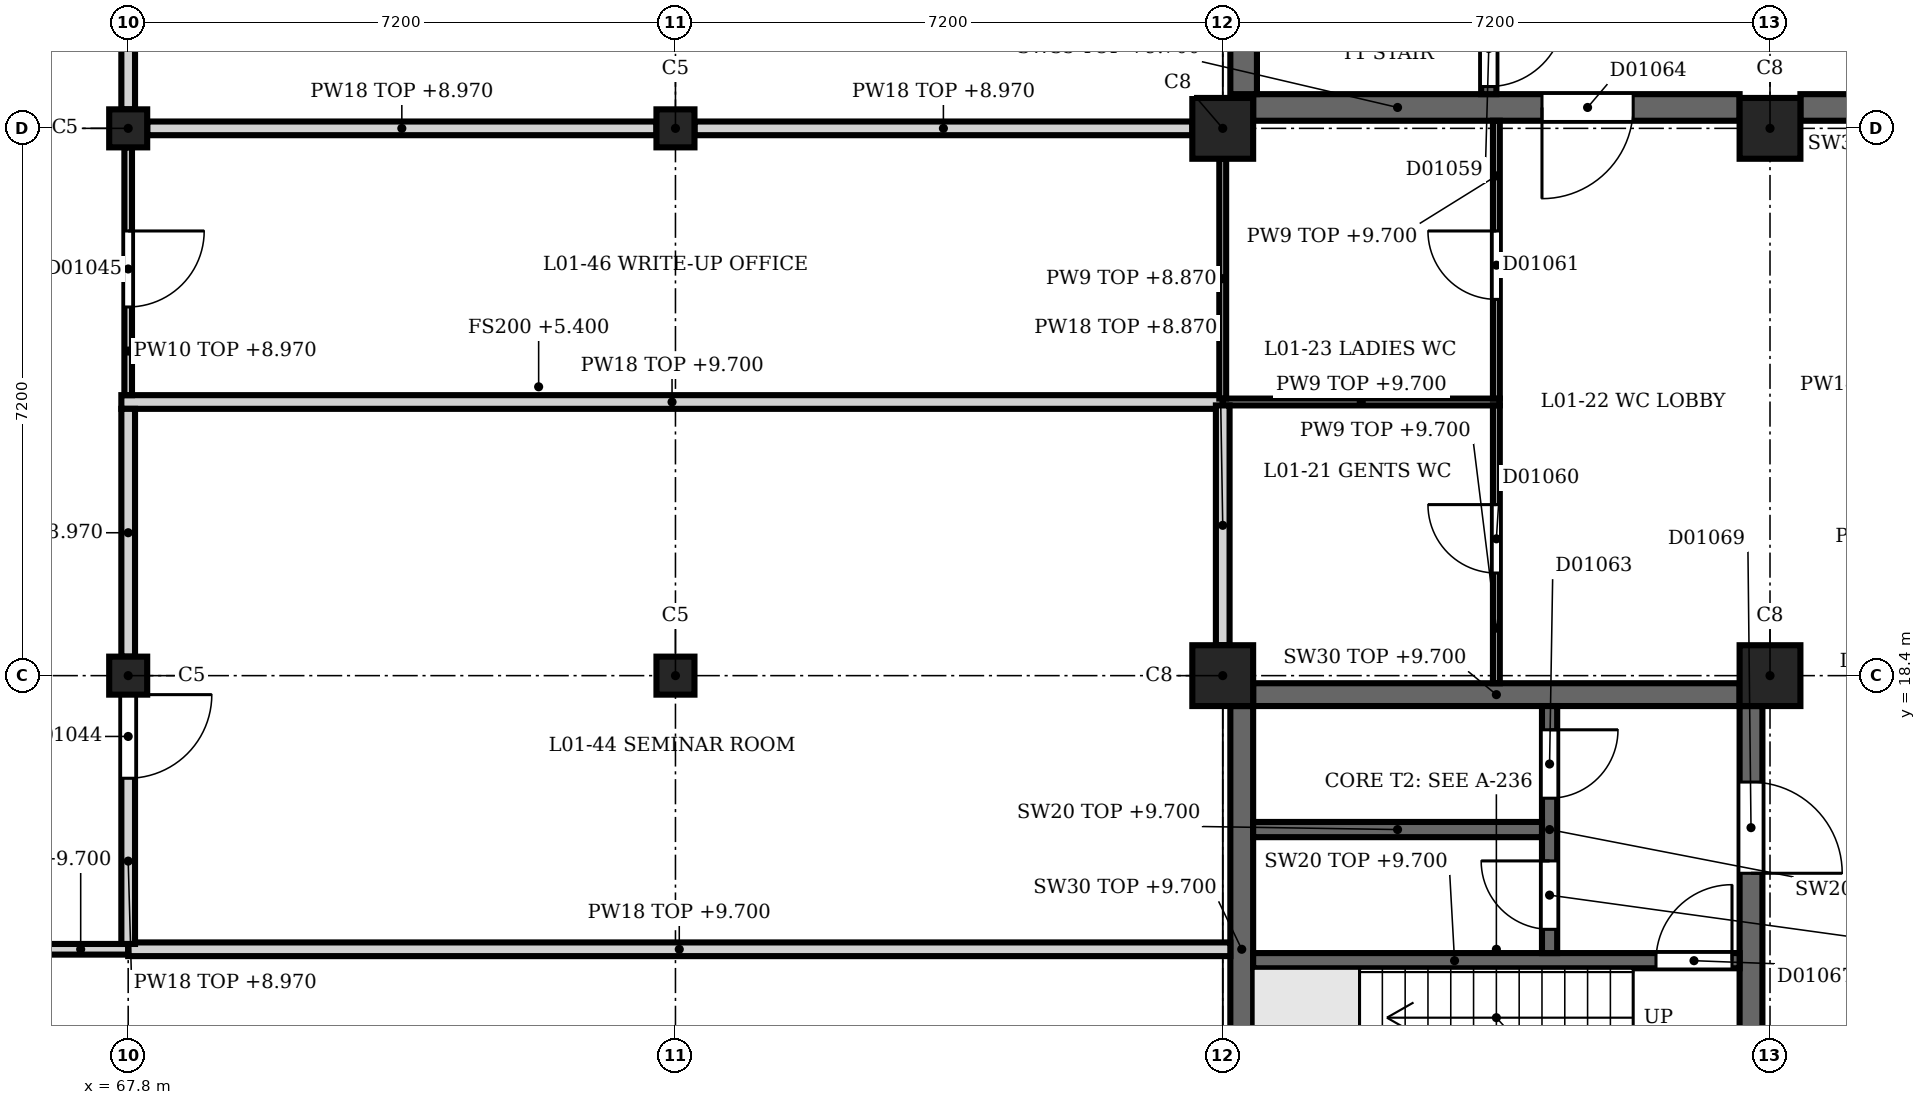
"""IFC4 building model, lengths in metres.
Left out: names, types, materials, properties, quantities, classifications, styles, units other than length and angle.
Written with IfcOpenShell. Run it as: python <this file> out.ifc"""

import sys

from ifc_helpers import new_model, si_unit, direction, frame, frame_2d, origin, origin_2d, place, context, subcontext, project, spatial, rectangle, extrude, element, fill, save


model = new_model("IFC4")
c1 = context("Model", 3, precision=1e-05, world=origin(), true_north=direction((0.0, 1.0)))
c2 = subcontext(c1, "Body", "Model", "MODEL_VIEW")
j1 = project(units=[si_unit("LENGTHUNIT", "METRE"), si_unit("PLANEANGLEUNIT", "RADIAN")], contexts=[c1])
p1 = place(None, origin())
s1 = spatial("IfcSite", under=j1, at=p1, CompositionType="ELEMENT")
p2 = place(p1, origin())
s2 = spatial("IfcBuilding", under=s1, at=p2, CompositionType="ELEMENT")
p3 = place(p2, frame((0.0, 0.0, 5.4)))
s3 = spatial("IfcBuildingStorey", under=s2, at=p3, CompositionType="ELEMENT", Elevation=5.4)
for number, where, z_axis, x_axis in (
    (1, (82.2, 18.4, 0.0), (0.0, 0.0, 1.0), (1.0, 0.0, 0.0)),
    (2, (82.2, 25.6, 0.0), (0.0, 0.0, 1.0), (1.0, 0.0, 0.0)),
    (3, (89.4, 18.4, 0.0), (0.0, 0.0, 1.0), (1.0, 0.0, 0.0)),
    (4, (89.4, 25.6, 0.0), (0.0, 0.0, 1.0), (1.0, 0.0, 0.0)),
):
    element("IfcColumn", number, at=place(p3, frame(where, z_axis=z_axis, x_axis=x_axis)), inside=s3, PredefinedType="COLUMN", context=c2, shape_type="SweptSolid", body=[
        extrude(rectangle(XDim=0.8, YDim=0.8, at=origin_2d()), origin(), (0.0, 0.0, 1.0), 4.5),
    ])
for number, where, z_axis, x_axis in (
    (5, (67.8, 18.4, 0.0), (0.0, 0.0, 1.0), (1.0, 0.0, 0.0)),
    (6, (67.8, 25.6, 0.0), (0.0, 0.0, 1.0), (1.0, 0.0, 0.0)),
    (7, (75.0, 18.4, 0.0), (0.0, 0.0, 1.0), (1.0, 0.0, 0.0)),
    (8, (75.0, 25.6, 0.0), (0.0, 0.0, 1.0), (1.0, 0.0, 0.0)),
):
    element("IfcColumn", number, at=place(p3, frame(where, z_axis=z_axis, x_axis=x_axis)), inside=s3, PredefinedType="COLUMN", context=c2, shape_type="SweptSolid", body=[
        extrude(rectangle(XDim=0.5, YDim=0.5, at=origin_2d()), origin(), (0.0, 0.0, 1.0), 4.5),
    ])
p4 = place(p3, frame((82.6, 25.875, 0.0), z_axis=(0.0, 0.0, 1.0), x_axis=(1.0, 0.0, 0.0)))
e9 = element("IfcWall", 9, at=p4, inside=s3, PredefinedType="SHEAR", context=c2, shape_type="SweptSolid", body=[
    extrude(rectangle(XDim=6.4, YDim=0.35, at=frame_2d((3.2, 0.0))), origin(), (0.0, 0.0, 1.0), 4.3),
])
p5 = place(p4, frame((3.8, 0.0, 0.0)))
e10 = element("IfcOpeningElement", 10, at=p5, cuts=e9, PredefinedType="OPENING", context=c2, shape_type="SweptSolid", body=[
    extrude(rectangle(XDim=1.2, YDim=2.1, at=frame_2d((0.6, 1.05))), frame((0.0, 0.185, 0.0), z_axis=(0.0, -1.0, 0.0), x_axis=(1.0, 0.0, 0.0)), (0.0, 0.0, 1.0), 0.37),
])
p6 = place(p3, frame((89.8, 25.875, 0.0), z_axis=(0.0, 0.0, 1.0), x_axis=(1.0, 0.0, 0.0)))
e11 = element("IfcWall", 11, at=p6, inside=s3, PredefinedType="SHEAR", context=c2, shape_type="SweptSolid", body=[
    extrude(rectangle(XDim=6.4, YDim=0.35, at=frame_2d((3.2, 0.0))), origin(), (0.0, 0.0, 1.0), 4.3),
])
p7 = place(p6, frame((2.6, 0.0, 0.0)))
e12 = element("IfcOpeningElement", 12, at=p7, cuts=e11, PredefinedType="OPENING", context=c2, shape_type="SweptSolid", body=[
    extrude(rectangle(XDim=1.8, YDim=2.1, at=frame_2d((0.9, 1.05))), frame((0.0, 0.185, 0.0), z_axis=(0.0, -1.0, 0.0), x_axis=(1.0, 0.0, 0.0)), (0.0, 0.0, 1.0), 0.37),
])
p8 = place(p3, frame((82.475, 26.05, 0.0), z_axis=(0.0, 0.0, 1.0), x_axis=(0.0, 1.0, 0.0)))
e13 = element("IfcWall", 13, at=p8, inside=s3, PredefinedType="SHEAR", context=c2, shape_type="SweptSolid", body=[
    extrude(rectangle(XDim=6.3, YDim=0.35, at=frame_2d((3.15, 0.0))), origin(), (0.0, 0.0, 1.0), 4.3),
])
p9 = place(p3, frame((85.7, 26.05, 0.0), z_axis=(0.0, 0.0, 1.0), x_axis=(0.0, 1.0, 0.0)))
e14 = element("IfcWall", 14, at=p9, inside=s3, PredefinedType="SHEAR", context=c2, shape_type="SweptSolid", body=[
    extrude(rectangle(XDim=6.3, YDim=0.2, at=frame_2d((3.15, 0.0))), origin(), (0.0, 0.0, 1.0), 4.3),
])
p10 = place(p9, frame((0.1, 0.0, 0.0)))
e15 = element("IfcOpeningElement", 15, at=p10, cuts=e14, PredefinedType="OPENING", context=c2, shape_type="SweptSolid", body=[
    extrude(rectangle(XDim=1.0, YDim=2.1, at=frame_2d((0.5, 1.05))), frame((0.0, 0.11, 0.0), z_axis=(0.0, -1.0, 0.0), x_axis=(1.0, 0.0, 0.0)), (0.0, 0.0, 1.0), 0.22),
])
p11 = place(p3, frame((89.15, 11.6, 0.0), z_axis=(0.0, 0.0, 1.0), x_axis=(0.0, 1.0, 0.0)))
e16 = element("IfcWall", 16, at=p11, inside=s3, PredefinedType="SHEAR", context=c2, shape_type="SweptSolid", body=[
    extrude(rectangle(XDim=6.4, YDim=0.3, at=frame_2d((3.2, 0.0))), origin(), (0.0, 0.0, 1.0), 4.3),
])
p12 = place(p11, frame((4.2, 0.0, 0.0)))
e17 = element("IfcOpeningElement", 17, at=p12, cuts=e16, PredefinedType="OPENING", context=c2, shape_type="SweptSolid", body=[
    extrude(rectangle(XDim=1.2, YDim=2.1, at=frame_2d((0.6, 1.05))), frame((0.0, 0.16, 0.0), z_axis=(0.0, -1.0, 0.0), x_axis=(1.0, 0.0, 0.0)), (0.0, 0.0, 1.0), 0.32),
])
for number, where, z_axis, x_axis in (
    (18, (82.45, 11.6, 0.0), (0.0, 0.0, 1.0), (0.0, 1.0, 0.0)),
    (19, (82.6, 18.15, 0.0), (0.0, 0.0, 1.0), (1.0, 0.0, 0.0)),
):
    element("IfcWall", number, at=place(p3, frame(where, z_axis=z_axis, x_axis=x_axis)), inside=s3, PredefinedType="SHEAR", context=c2, shape_type="SweptSolid", body=[
        extrude(rectangle(XDim=6.4, YDim=0.3, at=frame_2d((3.2, 0.0))), origin(), (0.0, 0.0, 1.0), 4.3),
    ])
p13 = place(p3, frame((89.0, 14.65, 0.0), z_axis=(0.0, 0.0, 1.0), x_axis=(-1.0, 0.0, 0.0)))
e20 = element("IfcWall", 20, at=p13, inside=s3, PredefinedType="SHEAR", context=c2, shape_type="SweptSolid", body=[
    extrude(rectangle(XDim=6.4, YDim=0.2, at=frame_2d((3.2, 0.0))), origin(), (0.0, 0.0, 1.0), 4.3),
])
p14 = place(p13, frame((0.1, 0.0, 0.0)))
e21 = element("IfcOpeningElement", 21, at=p14, cuts=e20, PredefinedType="OPENING", context=c2, shape_type="SweptSolid", body=[
    extrude(rectangle(XDim=1.0, YDim=2.1, at=frame_2d((0.5, 1.05))), frame((0.0, 0.11, 0.0), z_axis=(0.0, -1.0, 0.0), x_axis=(1.0, 0.0, 0.0)), (0.0, 0.0, 1.0), 0.22),
])
p15 = place(p3, frame((86.5, 18.0, 0.0), z_axis=(0.0, 0.0, 1.0), x_axis=(0.0, -1.0, 0.0)))
e22 = element("IfcWall", 22, at=p15, inside=s3, PredefinedType="SHEAR", context=c2, shape_type="SweptSolid", body=[
    extrude(rectangle(XDim=3.25, YDim=0.2, at=frame_2d((1.625, 0.0))), origin(), (0.0, 0.0, 1.0), 4.3),
])
p16 = place(p15, frame((2.038, 0.0, 0.0)))
e23 = element("IfcOpeningElement", 23, at=p16, cuts=e22, PredefinedType="OPENING", context=c2, shape_type="SweptSolid", body=[
    extrude(rectangle(XDim=0.9, YDim=2.1, at=frame_2d((0.45, 1.05))), frame((0.0, 0.11, 0.0), z_axis=(0.0, -1.0, 0.0), x_axis=(1.0, 0.0, 0.0)), (0.0, 0.0, 1.0), 0.22),
])
p17 = place(p15, frame((0.312, 0.0, 0.0)))
e24 = element("IfcOpeningElement", 24, at=p17, cuts=e22, PredefinedType="OPENING", context=c2, shape_type="SweptSolid", body=[
    extrude(rectangle(XDim=0.9, YDim=2.1, at=frame_2d((0.45, 1.05))), frame((0.0, 0.11, 0.0), z_axis=(0.0, -1.0, 0.0), x_axis=(1.0, 0.0, 0.0)), (0.0, 0.0, 1.0), 0.22),
])
p18 = place(p3, frame((82.6, 16.375, 0.0), z_axis=(0.0, 0.0, 1.0), x_axis=(1.0, 0.0, 0.0)))
e25 = element("IfcWall", 25, at=p18, inside=s3, PredefinedType="SHEAR", context=c2, shape_type="SweptSolid", body=[
    extrude(rectangle(XDim=3.8, YDim=0.2, at=frame_2d((1.9, 0.0))), origin(), (0.0, 0.0, 1.0), 4.3),
])
p19 = place(p3, frame((67.8, 14.8, 0.0), z_axis=(0.0, 0.0, 1.0), x_axis=(-1.0, 0.0, 0.0)))
e26 = element("IfcWall", 26, at=p19, inside=s3, PredefinedType="PARTITIONING", context=c2, shape_type="SweptSolid", body=[
    extrude(rectangle(XDim=3.6, YDim=0.14, at=frame_2d((1.8, 0.0))), origin(), (0.0, 0.0, 1.0), 4.3),
])
p20 = place(p19, frame((1.25, 0.0, 0.0)))
e27 = element("IfcOpeningElement", 27, at=p20, cuts=e26, PredefinedType="OPENING", context=c2, shape_type="SweptSolid", body=[
    extrude(rectangle(XDim=1.1, YDim=2.2, at=frame_2d((0.55, 1.1))), frame((0.0, 0.08, 0.0), z_axis=(0.0, -1.0, 0.0), x_axis=(1.0, 0.0, 0.0)), (0.0, 0.0, 1.0), 0.16),
])
p21 = place(p3, frame((67.8, 14.8, 0.0), z_axis=(0.0, 0.0, 1.0), x_axis=(1.0, 0.0, 0.0)))
e28 = element("IfcWall", 28, at=p21, inside=s3, PredefinedType="PARTITIONING", context=c2, shape_type="SweptSolid", body=[
    extrude(rectangle(XDim=14.5, YDim=0.18, at=frame_2d((7.25, 0.0))), origin(), (0.0, 0.0, 1.0), 4.3),
])
p22 = place(p3, frame((67.71, 22.0, 0.0), z_axis=(0.0, 0.0, 1.0), x_axis=(1.0, 0.0, 0.0)))
e29 = element("IfcWall", 29, at=p22, inside=s3, PredefinedType="PARTITIONING", context=c2, shape_type="SweptSolid", body=[
    extrude(rectangle(XDim=14.49, YDim=0.18, at=frame_2d((7.245, 0.0))), origin(), (0.0, 0.0, 1.0), 4.3),
])
p23 = place(p3, frame((82.2, 22.0, 0.0), z_axis=(0.0, 0.0, 1.0), x_axis=(1.0, 0.0, 0.0)))
e30 = element("IfcWall", 30, at=p23, inside=s3, PredefinedType="PARTITIONING", context=c2, shape_type="SweptSolid", body=[
    extrude(rectangle(XDim=3.645, YDim=0.09, at=frame_2d((1.823, 0.0))), origin(), (0.0, 0.0, 1.0), 4.3),
])
p24 = place(p3, frame((68.05, 25.6, 0.0), z_axis=(0.0, 0.0, 1.0), x_axis=(1.0, 0.0, 0.0)))
e31 = element("IfcWall", 31, at=p24, inside=s3, PredefinedType="PARTITIONING", context=c2, shape_type="SweptSolid", body=[
    extrude(rectangle(XDim=6.7, YDim=0.18, at=frame_2d((3.35, 0.0))), origin(), (0.0, 0.0, 1.0), 3.57),
])
p25 = place(p3, frame((75.25, 25.6, 0.0), z_axis=(0.0, 0.0, 1.0), x_axis=(1.0, 0.0, 0.0)))
e32 = element("IfcWall", 32, at=p25, inside=s3, PredefinedType="PARTITIONING", context=c2, shape_type="SweptSolid", body=[
    extrude(rectangle(XDim=6.55, YDim=0.18, at=frame_2d((3.275, 0.0))), origin(), (0.0, 0.0, 1.0), 3.57),
])
p26 = place(p3, frame((67.8, 18.15, 0.0), z_axis=(0.0, 0.0, 1.0), x_axis=(0.0, -1.0, 0.0)))
e33 = element("IfcWall", 33, at=p26, inside=s3, PredefinedType="PARTITIONING", context=c2, shape_type="SweptSolid", body=[
    extrude(rectangle(XDim=3.28, YDim=0.18, at=frame_2d((1.64, 0.0))), origin(), (0.0, 0.0, 1.0), 3.57),
])
p27 = place(p26, origin())
e34 = element("IfcOpeningElement", 34, at=p27, cuts=e33, PredefinedType="OPENING", context=c2, shape_type="SweptSolid", body=[
    extrude(rectangle(XDim=1.1, YDim=2.3, at=frame_2d((0.55, 1.15))), frame((0.0, 0.1, 0.0), z_axis=(0.0, -1.0, 0.0), x_axis=(1.0, 0.0, 0.0)), (0.0, 0.0, 1.0), 0.2),
])
p28 = place(p3, frame((67.8, 18.65, 0.0), z_axis=(0.0, 0.0, 1.0), x_axis=(0.0, 1.0, 0.0)))
e35 = element("IfcWall", 35, at=p28, inside=s3, PredefinedType="PARTITIONING", context=c2, shape_type="SweptSolid", body=[
    extrude(rectangle(XDim=3.26, YDim=0.18, at=frame_2d((1.63, 0.0))), origin(), (0.0, 0.0, 1.0), 3.57),
])
p29 = place(p3, frame((67.8, 25.35, 0.0), z_axis=(0.0, 0.0, 1.0), x_axis=(0.0, -1.0, 0.0)))
e36 = element("IfcWall", 36, at=p29, inside=s3, PredefinedType="PARTITIONING", context=c2, shape_type="SweptSolid", body=[
    extrude(rectangle(XDim=3.26, YDim=0.1, at=frame_2d((1.63, 0.0))), origin(), (0.0, 0.0, 1.0), 3.57),
])
p30 = place(p29, frame((1.1, 0.0, 0.0)))
e37 = element("IfcOpeningElement", 37, at=p30, cuts=e36, PredefinedType="OPENING", context=c2, shape_type="SweptSolid", body=[
    extrude(rectangle(XDim=1.0, YDim=2.1, at=frame_2d((0.5, 1.05))), frame((0.0, 0.06, 0.0), z_axis=(0.0, -1.0, 0.0), x_axis=(1.0, 0.0, 0.0)), (0.0, 0.0, 1.0), 0.12),
])
p31 = place(p3, frame((67.8, 25.85, 0.0), z_axis=(0.0, 0.0, 1.0), x_axis=(0.0, 1.0, 0.0)))
e38 = element("IfcWall", 38, at=p31, inside=s3, PredefinedType="PARTITIONING", context=c2, shape_type="SweptSolid", body=[
    extrude(rectangle(XDim=3.26, YDim=0.18, at=frame_2d((1.63, 0.0))), origin(), (0.0, 0.0, 1.0), 3.57),
])
p32 = place(p3, frame((82.2, 18.8, 0.0), z_axis=(0.0, 0.0, 1.0), x_axis=(0.0, 1.0, 0.0)))
e39 = element("IfcWall", 39, at=p32, inside=s3, PredefinedType="PARTITIONING", context=c2, shape_type="SweptSolid", body=[
    extrude(rectangle(XDim=3.155, YDim=0.18, at=frame_2d((1.578, 0.0))), origin(), (0.0, 0.0, 1.0), 3.47),
])
p33 = place(p3, frame((82.2, 22.045, 0.0), z_axis=(0.0, 0.0, 1.0), x_axis=(0.0, 1.0, 0.0)))
e40 = element("IfcWall", 40, at=p33, inside=s3, PredefinedType="PARTITIONING", context=c2, shape_type="SweptSolid", body=[
    extrude(rectangle(XDim=3.155, YDim=0.09, at=frame_2d((1.578, 0.0))), origin(), (0.0, 0.0, 1.0), 3.47),
])
p34 = place(p3, frame((85.8, 18.3, 0.0), z_axis=(0.0, 0.0, 1.0), x_axis=(0.0, 1.0, 0.0)))
e41 = element("IfcWall", 41, at=p34, inside=s3, PredefinedType="PARTITIONING", context=c2, shape_type="SweptSolid", body=[
    extrude(rectangle(XDim=3.655, YDim=0.09, at=frame_2d((1.828, 0.0))), origin(), (0.0, 0.0, 1.0), 4.3),
])
p35 = place(p34, frame((1.45, 0.0, 0.0)))
e42 = element("IfcOpeningElement", 42, at=p35, cuts=e41, PredefinedType="OPENING", context=c2, shape_type="SweptSolid", body=[
    extrude(rectangle(XDim=0.9, YDim=2.1, at=frame_2d((0.45, 1.05))), frame((0.0, 0.055, 0.0), z_axis=(0.0, -1.0, 0.0), x_axis=(1.0, 0.0, 0.0)), (0.0, 0.0, 1.0), 0.11),
])
p36 = place(p3, frame((85.8, 22.045, 0.0), z_axis=(0.0, 0.0, 1.0), x_axis=(0.0, 1.0, 0.0)))
e43 = element("IfcWall", 43, at=p36, inside=s3, PredefinedType="PARTITIONING", context=c2, shape_type="SweptSolid", body=[
    extrude(rectangle(XDim=3.655, YDim=0.09, at=frame_2d((1.828, 0.0))), origin(), (0.0, 0.0, 1.0), 4.3),
])
p37 = place(p36, frame((1.305, 0.0, 0.0)))
e44 = element("IfcOpeningElement", 44, at=p37, cuts=e43, PredefinedType="OPENING", context=c2, shape_type="SweptSolid", body=[
    extrude(rectangle(XDim=0.9, YDim=2.1, at=frame_2d((0.45, 1.05))), frame((0.0, 0.055, 0.0), z_axis=(0.0, -1.0, 0.0), x_axis=(1.0, 0.0, 0.0)), (0.0, 0.0, 1.0), 0.11),
])
p38 = place(p5, origin())
e45 = element("IfcDoor", 45, at=p38, inside=s3, OperationType="SINGLE_SWING_RIGHT", PredefinedType="DOOR", context=c2, shape_type="SweptSolid", body=[
    extrude(rectangle(XDim=1.2, YDim=2.1, at=frame_2d((0.6, 1.05))), frame((0.0, 0.025, 0.0), z_axis=(0.0, -1.0, 0.0), x_axis=(1.0, 0.0, 0.0)), (0.0, 0.0, 1.0), 0.05),
])
fill(e10, e45)
p39 = place(p10, origin())
e46 = element("IfcDoor", 46, at=p39, inside=s3, OperationType="SINGLE_SWING_LEFT", PredefinedType="DOOR", context=c2, shape_type="SweptSolid", body=[
    extrude(rectangle(XDim=1.0, YDim=2.1, at=frame_2d((0.5, 1.05))), frame((0.0, 0.025, 0.0), z_axis=(0.0, -1.0, 0.0), x_axis=(1.0, 0.0, 0.0)), (0.0, 0.0, 1.0), 0.05),
])
fill(e15, e46)
p40 = place(p12, origin())
e47 = element("IfcDoor", 47, at=p40, inside=s3, OperationType="SINGLE_SWING_RIGHT", PredefinedType="DOOR", context=c2, shape_type="SweptSolid", body=[
    extrude(rectangle(XDim=1.2, YDim=2.1, at=frame_2d((0.6, 1.05))), frame((0.0, 0.025, 0.0), z_axis=(0.0, -1.0, 0.0), x_axis=(1.0, 0.0, 0.0)), (0.0, 0.0, 1.0), 0.05),
])
fill(e17, e47)
p41 = place(p16, origin())
e48 = element("IfcDoor", 48, at=p41, inside=s3, OperationType="SINGLE_SWING_RIGHT", PredefinedType="DOOR", context=c2, shape_type="SweptSolid", body=[
    extrude(rectangle(XDim=0.9, YDim=2.1, at=frame_2d((0.45, 1.05))), frame((0.0, 0.025, 0.0), z_axis=(0.0, -1.0, 0.0), x_axis=(1.0, 0.0, 0.0)), (0.0, 0.0, 1.0), 0.05),
])
fill(e23, e48)
p42 = place(p17, origin())
e49 = element("IfcDoor", 49, at=p42, inside=s3, OperationType="SINGLE_SWING_LEFT", PredefinedType="DOOR", context=c2, shape_type="SweptSolid", body=[
    extrude(rectangle(XDim=0.9, YDim=2.1, at=frame_2d((0.45, 1.05))), frame((0.0, 0.025, 0.0), z_axis=(0.0, -1.0, 0.0), x_axis=(1.0, 0.0, 0.0)), (0.0, 0.0, 1.0), 0.05),
])
fill(e24, e49)
p43 = place(p14, origin())
e50 = element("IfcDoor", 50, at=p43, inside=s3, OperationType="SINGLE_SWING_LEFT", PredefinedType="DOOR", context=c2, shape_type="SweptSolid", body=[
    extrude(rectangle(XDim=1.0, YDim=2.1, at=frame_2d((0.5, 1.05))), frame((0.0, 0.025, 0.0), z_axis=(0.0, -1.0, 0.0), x_axis=(1.0, 0.0, 0.0)), (0.0, 0.0, 1.0), 0.05),
])
fill(e21, e50)
p44 = place(p27, origin())
e51 = element("IfcDoor", 51, at=p44, inside=s3, OperationType="SINGLE_SWING_LEFT", PredefinedType="DOOR", context=c2, shape_type="SweptSolid", body=[
    extrude(rectangle(XDim=1.1, YDim=2.3, at=frame_2d((0.55, 1.15))), frame((0.0, 0.025, 0.0), z_axis=(0.0, -1.0, 0.0), x_axis=(1.0, 0.0, 0.0)), (0.0, 0.0, 1.0), 0.05),
])
fill(e34, e51)
p45 = place(p30, origin())
e52 = element("IfcDoor", 52, at=p45, inside=s3, OperationType="SINGLE_SWING_LEFT", PredefinedType="DOOR", context=c2, shape_type="SweptSolid", body=[
    extrude(rectangle(XDim=1.0, YDim=2.1, at=frame_2d((0.5, 1.05))), frame((0.0, 0.025, 0.0), z_axis=(0.0, -1.0, 0.0), x_axis=(1.0, 0.0, 0.0)), (0.0, 0.0, 1.0), 0.05),
])
fill(e37, e52)
p46 = place(p35, origin())
e53 = element("IfcDoor", 53, at=p46, inside=s3, OperationType="SINGLE_SWING_RIGHT", PredefinedType="DOOR", context=c2, shape_type="SweptSolid", body=[
    extrude(rectangle(XDim=0.9, YDim=2.1, at=frame_2d((0.45, 1.05))), frame((0.0, 0.025, 0.0), z_axis=(0.0, -1.0, 0.0), x_axis=(1.0, 0.0, 0.0)), (0.0, 0.0, 1.0), 0.05),
])
fill(e42, e53)
p47 = place(p37, origin())
e54 = element("IfcDoor", 54, at=p47, inside=s3, OperationType="SINGLE_SWING_LEFT", PredefinedType="DOOR", context=c2, shape_type="SweptSolid", body=[
    extrude(rectangle(XDim=0.9, YDim=2.1, at=frame_2d((0.45, 1.05))), frame((0.0, 0.025, 0.0), z_axis=(0.0, -1.0, 0.0), x_axis=(1.0, 0.0, 0.0)), (0.0, 0.0, 1.0), 0.05),
])
fill(e44, e54)
save(model, sys.argv[1])
